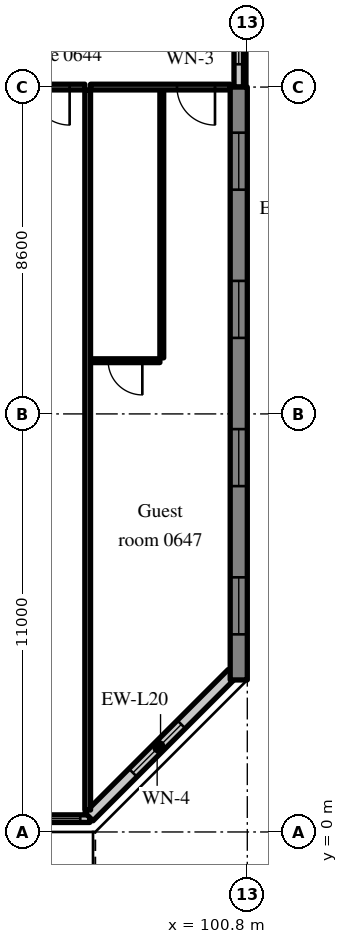
"""IFC4 building model, lengths in metres.
Left out: names, types, materials, properties, quantities, classifications, styles, units other than length and angle.
Written with IfcOpenShell. Run it as: python <this file> out.ifc"""

import sys

from ifc_helpers import new_model, si_unit, direction, frame, frame_2d, origin, place, context, subcontext, project, spatial, rectangle, extrude, source, transform, mapped, element, fill, save


model = new_model("IFC4")
c1 = context("Model", 3, precision=1e-05, world=origin(), true_north=direction((0.0, 1.0)))
c2 = subcontext(c1, "Body", "Model", "MODEL_VIEW")
j1 = project(units=[si_unit("LENGTHUNIT", "METRE"), si_unit("PLANEANGLEUNIT", "RADIAN")], contexts=[c1])
p1 = place(None, origin())
s1 = spatial("IfcSite", under=j1, at=p1, CompositionType="ELEMENT")
p2 = place(p1, origin())
s2 = spatial("IfcBuilding", under=s1, at=p2, CompositionType="ELEMENT")
p3 = place(p2, frame((0.0, 0.0, 31.6)))
s3 = spatial("IfcBuildingStorey", under=s2, at=p3, CompositionType="ELEMENT", Elevation=31.6)
m1 = source(origin(), c2, "Body", "SweptSolid", [
    extrude(rectangle(XDim=15.6, YDim=0.45, at=frame_2d((7.8, 0.0))), origin(), (0.0, 0.0, 1.0), 3.52),
])
p4 = place(p3, frame((100.575, 4.0, 0.0), z_axis=(0.0, 0.0, 1.0), x_axis=(0.0, 1.0, 0.0)))
e1 = element("IfcWall", 1, at=p4, inside=s3, PredefinedType="SHEAR", context=c2, shape_type="MappedRepresentation", body=[
    mapped(m1, transform((0.0, 0.0, 0.0), scale=1.0)),
])
m2 = source(origin(), c2, "Body", "SweptSolid", [
    extrude(rectangle(XDim=1.5, YDim=1.5, at=frame_2d((0.75, 0.75))), frame((0.0, 0.235, 0.0), z_axis=(0.0, -1.0, 0.0), x_axis=(1.0, 0.0, 0.0)), (0.0, 0.0, 1.0), 0.47),
])
p5 = place(p4, frame((1.2, 0.0, 0.9)))
e2 = element("IfcOpeningElement", 2, at=p5, cuts=e1, PredefinedType="OPENING", context=c2, shape_type="MappedRepresentation", body=[
    mapped(m2, transform((0.0, 0.0, 0.0), scale=1.0)),
])
p6 = place(p4, frame((5.1, 0.0, 0.9)))
e3 = element("IfcOpeningElement", 3, at=p6, cuts=e1, PredefinedType="OPENING", context=c2, shape_type="MappedRepresentation", body=[
    mapped(m2, transform((0.0, 0.0, 0.0), scale=1.0)),
])
p7 = place(p4, frame((9.0, 0.0, 0.9)))
e4 = element("IfcOpeningElement", 4, at=p7, cuts=e1, PredefinedType="OPENING", context=c2, shape_type="MappedRepresentation", body=[
    mapped(m2, transform((0.0, 0.0, 0.0), scale=1.0)),
])
p8 = place(p4, frame((12.9, 0.0, 0.9)))
e5 = element("IfcOpeningElement", 5, at=p8, cuts=e1, PredefinedType="OPENING", context=c2, shape_type="MappedRepresentation", body=[
    mapped(m2, transform((0.0, 0.0, 0.0), scale=1.0)),
])
m3 = source(origin(), c2, "Body", "SweptSolid", [
    extrude(rectangle(XDim=4.03, YDim=0.2, at=frame_2d((2.015, 0.0))), origin(), (0.0, 0.0, 1.0), 2.77),
])
p9 = place(p3, frame((92.625, 0.35, 0.0), z_axis=(0.0, 0.0, 1.0), x_axis=(1.0, 0.0, 0.0)))
e6 = element("IfcWall", 6, at=p9, inside=s3, PredefinedType="SOLIDWALL", context=c2, shape_type="MappedRepresentation", body=[
    mapped(m3, transform((0.0, 0.0, 0.0), scale=1.0)),
])
m4 = source(origin(), c2, "Body", "SweptSolid", [
    extrude(rectangle(XDim=1.2, YDim=2.4, at=frame_2d((0.6, 1.2))), frame((0.0, 0.11, 0.0), z_axis=(0.0, -1.0, 0.0), x_axis=(1.0, 0.0, 0.0)), (0.0, 0.0, 1.0), 0.22),
])
p10 = place(p9, frame((0.25, 0.0, 0.0)))
e7 = element("IfcOpeningElement", 7, at=p10, cuts=e6, PredefinedType="OPENING", context=c2, shape_type="MappedRepresentation", body=[
    mapped(m4, transform((0.0, 0.0, 0.0), scale=1.0)),
])
m5 = source(origin(), c2, "Body", "SweptSolid", [
    extrude(rectangle(XDim=1.5, YDim=1.5, at=frame_2d((0.75, 0.75))), frame((0.0, 0.11, 0.0), z_axis=(0.0, -1.0, 0.0), x_axis=(1.0, 0.0, 0.0)), (0.0, 0.0, 1.0), 0.22),
])
p11 = place(p9, frame((2.28, 0.0, 0.9)))
e8 = element("IfcOpeningElement", 8, at=p11, cuts=e6, PredefinedType="OPENING", context=c2, shape_type="MappedRepresentation", body=[
    mapped(m5, transform((0.0, 0.0, 0.0), scale=1.0)),
])
m6 = source(origin(), c2, "Body", "SweptSolid", [
    extrude(rectangle(XDim=5.326, YDim=0.3, at=frame_2d((2.663, 0.0))), origin(), (0.0, 0.0, 1.0), 3.52),
])
p12 = place(p3, frame((96.634, 0.4, 0.0), z_axis=(0.0, 0.0, 1.0), x_axis=(0.707083859269, 0.707129702361, 0.0)))
e9 = element("IfcWall", 9, at=p12, inside=s3, PredefinedType="SOLIDWALL", context=c2, shape_type="MappedRepresentation", body=[
    mapped(m6, transform((0.0, 0.0, 0.0), scale=1.0)),
])
m7 = source(origin(), c2, "Body", "SweptSolid", [
    extrude(rectangle(XDim=1.8, YDim=1.5, at=frame_2d((0.9, 0.75))), frame((0.0, 0.16, 0.0), z_axis=(0.0, -1.0, 0.0), x_axis=(1.0, 0.0, 0.0)), (0.0, 0.0, 1.0), 0.32),
])
p13 = place(p12, frame((1.636, 0.0, 0.9)))
e10 = element("IfcOpeningElement", 10, at=p13, cuts=e9, PredefinedType="OPENING", context=c2, shape_type="MappedRepresentation", body=[
    mapped(m7, transform((0.0, 0.0, 0.0), scale=1.0)),
])
m8 = source(origin(), c2, "Body", "SweptSolid", [
    extrude(rectangle(XDim=2.4, YDim=0.25, at=frame_2d((1.2, 0.0))), origin(), (0.0, 0.0, 1.0), 2.62),
])
p14 = place(p3, frame((100.575, 19.6, 0.0), z_axis=(0.0, 0.0, 1.0), x_axis=(0.0, 1.0, 0.0)))
e11 = element("IfcWall", 11, at=p14, inside=s3, PredefinedType="SOLIDWALL", context=c2, shape_type="MappedRepresentation", body=[
    mapped(m8, transform((0.0, 0.0, 0.0), scale=1.0)),
])
m9 = source(origin(), c2, "Body", "SweptSolid", [
    extrude(rectangle(XDim=1.2, YDim=1.5, at=frame_2d((0.6, 0.75))), frame((0.0, 0.135, 0.0), z_axis=(0.0, -1.0, 0.0), x_axis=(1.0, 0.0, 0.0)), (0.0, 0.0, 1.0), 0.27),
])
p15 = place(p14, frame((0.6, 0.0, 0.9)))
e12 = element("IfcOpeningElement", 12, at=p15, cuts=e11, PredefinedType="OPENING", context=c2, shape_type="MappedRepresentation", body=[
    mapped(m9, transform((0.0, 0.0, 0.0), scale=1.0)),
])
m10 = source(origin(), c2, "Body", "SweptSolid", [
    extrude(rectangle(XDim=3.9, YDim=0.15, at=frame_2d((1.95, 0.0))), origin(), (0.0, 0.0, 1.0), 2.82),
])
p16 = place(p3, frame((92.625, 19.6, 0.0), z_axis=(0.0, 0.0, 1.0), x_axis=(1.0, 0.0, 0.0)))
e13 = element("IfcWall", 13, at=p16, inside=s3, PredefinedType="PARTITIONING", context=c2, shape_type="MappedRepresentation", body=[
    mapped(m10, transform((0.0, 0.0, 0.0), scale=1.0)),
])
m11 = source(origin(), c2, "Body", "SweptSolid", [
    extrude(rectangle(XDim=1.0, YDim=2.1, at=frame_2d((0.5, 1.05))), frame((0.0, 0.085, 0.0), z_axis=(0.0, -1.0, 0.0), x_axis=(1.0, 0.0, 0.0)), (0.0, 0.0, 1.0), 0.17),
])
p17 = place(p16, frame((2.5, 0.0, 0.0)))
e14 = element("IfcOpeningElement", 14, at=p17, cuts=e13, PredefinedType="OPENING", context=c2, shape_type="MappedRepresentation", body=[
    mapped(m11, transform((0.0, 0.0, 0.0), scale=1.0)),
])
m12 = source(origin(), c2, "Body", "SweptSolid", [
    extrude(rectangle(XDim=7.05, YDim=0.1, at=frame_2d((3.525, 0.0))), origin(), (0.0, 0.0, 1.0), 3.52),
])
p18 = place(p3, frame((98.55, 12.475, 0.0), z_axis=(0.0, 0.0, 1.0), x_axis=(0.0, 1.0, 0.0)))
e15 = element("IfcWall", 15, at=p18, inside=s3, PredefinedType="PARTITIONING", context=c2, shape_type="MappedRepresentation", body=[
    mapped(m12, transform((0.0, 0.0, 0.0), scale=1.0)),
])
m13 = source(origin(), c2, "Body", "SweptSolid", [
    extrude(rectangle(XDim=1.825, YDim=0.1, at=frame_2d((0.913, 0.0))), origin(), (0.0, 0.0, 1.0), 3.52),
])
p19 = place(p3, frame((96.675, 12.4, 0.0), z_axis=(0.0, 0.0, 1.0), x_axis=(1.0, 0.0, 0.0)))
e16 = element("IfcWall", 16, at=p19, inside=s3, PredefinedType="PARTITIONING", context=c2, shape_type="MappedRepresentation", body=[
    mapped(m13, transform((0.0, 0.0, 0.0), scale=1.0)),
])
m14 = source(origin(), c2, "Body", "SweptSolid", [
    extrude(rectangle(XDim=0.9, YDim=2.1, at=frame_2d((0.45, 1.05))), frame((0.0, 0.06, 0.0), z_axis=(0.0, -1.0, 0.0), x_axis=(1.0, 0.0, 0.0)), (0.0, 0.0, 1.0), 0.12),
])
p20 = place(p19, frame((0.463, 0.0, 0.0)))
e17 = element("IfcOpeningElement", 17, at=p20, cuts=e16, PredefinedType="OPENING", context=c2, shape_type="MappedRepresentation", body=[
    mapped(m14, transform((0.0, 0.0, 0.0), scale=1.0)),
])
m15 = source(origin(), c2, "Body", "SweptSolid", [
    extrude(rectangle(XDim=3.675, YDim=0.15, at=frame_2d((1.837, 0.0))), origin(), (0.0, 0.0, 1.0), 2.82),
])
p21 = place(p3, frame((96.675, 19.6, 0.0), z_axis=(0.0, 0.0, 1.0), x_axis=(1.0, 0.0, 0.0)))
e18 = element("IfcWall", 18, at=p21, inside=s3, PredefinedType="PARTITIONING", context=c2, shape_type="MappedRepresentation", body=[
    mapped(m15, transform((0.0, 0.0, 0.0), scale=1.0)),
])
p22 = place(p21, frame((2.275, 0.0, 0.0)))
e19 = element("IfcOpeningElement", 19, at=p22, cuts=e18, PredefinedType="OPENING", context=c2, shape_type="MappedRepresentation", body=[
    mapped(m11, transform((0.0, 0.0, 0.0), scale=1.0)),
])
m16 = source(origin(), c2, "Body", "SweptSolid", [
    extrude(rectangle(XDim=18.947, YDim=0.15, at=frame_2d((9.474, 0.0))), origin(), (0.0, 0.0, 1.0), 3.52),
])
p23 = place(p3, frame((96.6, 0.578, 0.0), z_axis=(0.0, 0.0, 1.0), x_axis=(0.0, 1.0, 0.0)))
e20 = element("IfcWall", 20, at=p23, inside=s3, PredefinedType="PARTITIONING", context=c2, shape_type="MappedRepresentation", body=[
    mapped(m16, transform((0.0, 0.0, 0.0), scale=1.0)),
])
m17 = source(origin(), c2, "Body", "SweptSolid", [
    extrude(rectangle(XDim=1.5, YDim=1.5, at=frame_2d((0.75, 0.75))), frame((0.0, 0.03, 0.0), z_axis=(0.0, -1.0, 0.0), x_axis=(1.0, 0.0, 0.0)), (0.0, 0.0, 1.0), 0.06),
])
p24 = place(p11, origin())
e21 = element("IfcWindow", 21, at=p24, inside=s3, PartitioningType="SINGLE_PANEL", PredefinedType="WINDOW", context=c2, shape_type="MappedRepresentation", body=[
    mapped(m17, transform((0.0, 0.0, 0.0), scale=1.0)),
])
fill(e8, e21)
m18 = source(origin(), c2, "Body", "SweptSolid", [
    extrude(rectangle(XDim=1.8, YDim=1.5, at=frame_2d((0.9, 0.75))), frame((0.0, 0.03, 0.0), z_axis=(0.0, -1.0, 0.0), x_axis=(1.0, 0.0, 0.0)), (0.0, 0.0, 1.0), 0.06),
])
p25 = place(p13, origin())
e22 = element("IfcWindow", 22, at=p25, inside=s3, PartitioningType="SINGLE_PANEL", PredefinedType="WINDOW", context=c2, shape_type="MappedRepresentation", body=[
    mapped(m18, transform((0.0, 0.0, 0.0), scale=1.0)),
])
fill(e10, e22)
p26 = place(p5, origin())
e23 = element("IfcWindow", 23, at=p26, inside=s3, PartitioningType="SINGLE_PANEL", PredefinedType="WINDOW", context=c2, shape_type="MappedRepresentation", body=[
    mapped(m17, transform((0.0, 0.0, 0.0), scale=1.0)),
])
fill(e2, e23)
p27 = place(p6, origin())
e24 = element("IfcWindow", 24, at=p27, inside=s3, PartitioningType="SINGLE_PANEL", PredefinedType="WINDOW", context=c2, shape_type="MappedRepresentation", body=[
    mapped(m17, transform((0.0, 0.0, 0.0), scale=1.0)),
])
fill(e3, e24)
p28 = place(p7, origin())
e25 = element("IfcWindow", 25, at=p28, inside=s3, PartitioningType="SINGLE_PANEL", PredefinedType="WINDOW", context=c2, shape_type="MappedRepresentation", body=[
    mapped(m17, transform((0.0, 0.0, 0.0), scale=1.0)),
])
fill(e4, e25)
p29 = place(p8, origin())
e26 = element("IfcWindow", 26, at=p29, inside=s3, PartitioningType="SINGLE_PANEL", PredefinedType="WINDOW", context=c2, shape_type="MappedRepresentation", body=[
    mapped(m17, transform((0.0, 0.0, 0.0), scale=1.0)),
])
fill(e5, e26)
m19 = source(origin(), c2, "Body", "SweptSolid", [
    extrude(rectangle(XDim=1.2, YDim=1.5, at=frame_2d((0.6, 0.75))), frame((0.0, 0.03, 0.0), z_axis=(0.0, -1.0, 0.0), x_axis=(1.0, 0.0, 0.0)), (0.0, 0.0, 1.0), 0.06),
])
p30 = place(p15, origin())
e27 = element("IfcWindow", 27, at=p30, inside=s3, PartitioningType="SINGLE_PANEL", PredefinedType="WINDOW", context=c2, shape_type="MappedRepresentation", body=[
    mapped(m19, transform((0.0, 0.0, 0.0), scale=1.0)),
])
fill(e12, e27)
m20 = source(origin(), c2, "Body", "SweptSolid", [
    extrude(rectangle(XDim=1.0, YDim=2.1, at=frame_2d((0.5, 1.05))), frame((0.0, 0.025, 0.0), z_axis=(0.0, -1.0, 0.0), x_axis=(1.0, 0.0, 0.0)), (0.0, 0.0, 1.0), 0.05),
])
p31 = place(p17, origin())
e28 = element("IfcDoor", 28, at=p31, inside=s3, OperationType="SINGLE_SWING_RIGHT", PredefinedType="DOOR", context=c2, shape_type="MappedRepresentation", body=[
    mapped(m20, transform((0.0, 0.0, 0.0), scale=1.0)),
])
fill(e14, e28)
m21 = source(origin(), c2, "Body", "SweptSolid", [
    extrude(rectangle(XDim=0.9, YDim=2.1, at=frame_2d((0.45, 1.05))), frame((0.0, 0.025, 0.0), z_axis=(0.0, -1.0, 0.0), x_axis=(1.0, 0.0, 0.0)), (0.0, 0.0, 1.0), 0.05),
])
p32 = place(p20, origin())
e29 = element("IfcDoor", 29, at=p32, inside=s3, OperationType="SINGLE_SWING_RIGHT", PredefinedType="DOOR", context=c2, shape_type="MappedRepresentation", body=[
    mapped(m21, transform((0.0, 0.0, 0.0), scale=1.0)),
])
fill(e17, e29)
p33 = place(p22, origin())
e30 = element("IfcDoor", 30, at=p33, inside=s3, OperationType="SINGLE_SWING_RIGHT", PredefinedType="DOOR", context=c2, shape_type="MappedRepresentation", body=[
    mapped(m20, transform((0.0, 0.0, 0.0), scale=1.0)),
])
fill(e19, e30)
save(model, sys.argv[1])
